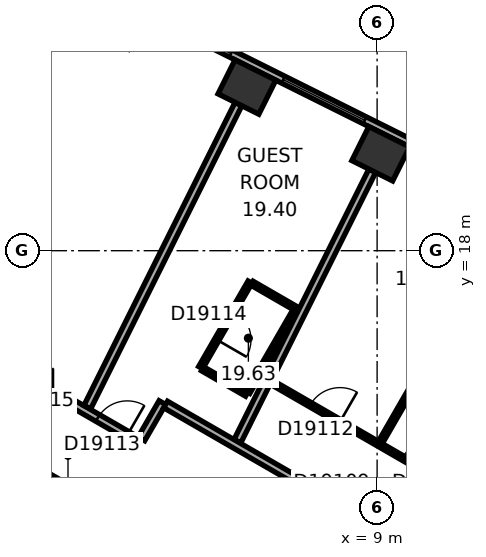
"""IFC4 building model, lengths in metres.
Left out: names, types, materials, properties, quantities, classifications, styles, units other than length and angle.
Written with IfcOpenShell. Run it as: python <this file> out.ifc"""

import sys

from ifc_helpers import new_model, si_unit, direction, frame, frame_2d, origin, origin_2d, place, context, subcontext, project, spatial, rectangle, extrude, element, fill, save


model = new_model("IFC4")
c1 = context("Model", 3, precision=1e-05, world=origin(), true_north=direction((0.0, 1.0)))
c2 = subcontext(c1, "Body", "Model", "MODEL_VIEW")
j1 = project(units=[si_unit("LENGTHUNIT", "METRE"), si_unit("PLANEANGLEUNIT", "RADIAN")], contexts=[c1])
p1 = place(None, origin())
s1 = spatial("IfcSite", under=j1, at=p1, CompositionType="ELEMENT")
p2 = place(p1, origin())
s2 = spatial("IfcBuilding", under=s1, at=p2, CompositionType="ELEMENT")
p3 = place(p2, frame((0.0, 0.0, 86.9)))
s3 = spatial("IfcBuildingStorey", under=s2, at=p3, CompositionType="ELEMENT", Elevation=86.9)
for number, where, z_axis, x_axis in (
    (1, (9.095, 20.551, 0.0), (0.0, 0.0, 1.0), (-0.895, 0.446, 0.0)),
    (2, (5.574, 22.306, 0.0), (0.0, 0.0, 1.0), (-0.895, 0.446, 0.0)),
):
    element("IfcColumn", number, at=place(p3, frame(where, z_axis=z_axis, x_axis=x_axis)), inside=s3, PredefinedType="COLUMN", context=c2, shape_type="SweptSolid", body=[
        extrude(rectangle(XDim=1.2, YDim=1.0, at=origin_2d()), origin(), (0.0, 0.0, 1.0), 3.3),
    ])
p4 = place(p3, frame((10.4, 5.658, 0.0), z_axis=(0.0, 0.0, 1.0), x_axis=(-0.866021384402, 0.500006961711, 0.0)))
e3 = element("IfcWall", 3, at=p4, inside=s3, PredefinedType="SHEAR", context=c2, shape_type="SweptSolid", body=[
    extrude(rectangle(XDim=12.355, YDim=1.2, at=frame_2d((6.178, 0.0))), origin(), (0.0, 0.0, 1.0), 3.3),
])
p5 = place(p4, frame((2.728, 0.0, 0.0)))
e4 = element("IfcOpeningElement", 4, at=p5, cuts=e3, PredefinedType="OPENING", context=c2, shape_type="SweptSolid", body=[
    extrude(rectangle(XDim=1.1, YDim=2.1, at=frame_2d((0.55, 1.05))), frame((0.0, 0.61, 0.0), z_axis=(0.0, -1.0, 0.0), x_axis=(1.0, 0.0, 0.0)), (0.0, 0.0, 1.0), 1.22),
])
p6 = place(p4, frame((5.328, 0.0, 0.0)))
e5 = element("IfcOpeningElement", 5, at=p6, cuts=e3, PredefinedType="OPENING", context=c2, shape_type="SweptSolid", body=[
    extrude(rectangle(XDim=1.1, YDim=2.1, at=frame_2d((0.55, 1.05))), frame((0.0, 0.61, 0.0), z_axis=(0.0, -1.0, 0.0), x_axis=(1.0, 0.0, 0.0)), (0.0, 0.0, 1.0), 1.22),
])
p7 = place(p4, frame((7.928, 0.0, 0.0)))
e6 = element("IfcOpeningElement", 6, at=p7, cuts=e3, PredefinedType="OPENING", context=c2, shape_type="SweptSolid", body=[
    extrude(rectangle(XDim=1.1, YDim=2.1, at=frame_2d((0.55, 1.05))), frame((0.0, 0.61, 0.0), z_axis=(0.0, -1.0, 0.0), x_axis=(1.0, 0.0, 0.0)), (0.0, 0.0, 1.0), 1.22),
])
p8 = place(p3, frame((0.3, 11.836, 0.0), z_axis=(0.0, 0.0, 1.0), x_axis=(-0.866021384402, -0.500006961711, 0.0)))
e7 = element("IfcWall", 7, at=p8, inside=s3, PredefinedType="SHEAR", context=c2, shape_type="SweptSolid", body=[
    extrude(rectangle(XDim=12.355, YDim=1.2, at=frame_2d((6.178, 0.0))), origin(), (0.0, 0.0, 1.0), 3.3),
])
p9 = place(p8, frame((6.378, 0.0, 0.0)))
e8 = element("IfcOpeningElement", 8, at=p9, cuts=e7, PredefinedType="OPENING", context=c2, shape_type="SweptSolid", body=[
    extrude(rectangle(XDim=1.5, YDim=2.1, at=frame_2d((0.75, 1.05))), frame((0.0, 0.61, 0.0), z_axis=(0.0, -1.0, 0.0), x_axis=(1.0, 0.0, 0.0)), (0.0, 0.0, 1.0), 1.22),
])
p10 = place(p8, frame((1.828, 0.0, 0.0)))
e9 = element("IfcOpeningElement", 9, at=p10, cuts=e7, PredefinedType="OPENING", context=c2, shape_type="SweptSolid", body=[
    extrude(rectangle(XDim=1.1, YDim=2.1, at=frame_2d((0.55, 1.05))), frame((0.0, 0.61, 0.0), z_axis=(0.0, -1.0, 0.0), x_axis=(1.0, 0.0, 0.0)), (0.0, 0.0, 1.0), 1.22),
])
p11 = place(p3, frame((20.63, 15.47, 0.0), z_axis=(0.0, 0.0, 1.0), x_axis=(-0.894934518609, 0.446197498203, 0.0)))
e10 = element("IfcWall", 10, at=p11, inside=s3, PredefinedType="STANDARD", context=c2, shape_type="SweptSolid", body=[
    extrude(rectangle(XDim=21.246, YDim=0.2, at=frame_2d((10.623, 0.0))), origin(), (0.0, 0.0, 1.0), 3.3),
])
p12 = place(p11, frame((1.553, 0.0, 0.8)))
e11 = element("IfcOpeningElement", 11, at=p12, cuts=e10, PredefinedType="OPENING", context=c2, shape_type="SweptSolid", body=[
    extrude(rectangle(XDim=2.4, YDim=1.7, at=frame_2d((1.2, 0.85))), frame((0.0, 0.11, 0.0), z_axis=(0.0, -1.0, 0.0), x_axis=(1.0, 0.0, 0.0)), (0.0, 0.0, 1.0), 0.22),
])
p13 = place(p11, frame((5.488, 0.0, 0.8)))
e12 = element("IfcOpeningElement", 12, at=p13, cuts=e10, PredefinedType="OPENING", context=c2, shape_type="SweptSolid", body=[
    extrude(rectangle(XDim=2.4, YDim=1.7, at=frame_2d((1.2, 0.85))), frame((0.0, 0.11, 0.0), z_axis=(0.0, -1.0, 0.0), x_axis=(1.0, 0.0, 0.0)), (0.0, 0.0, 1.0), 0.22),
])
p14 = place(p11, frame((9.422, 0.0, 0.8)))
e13 = element("IfcOpeningElement", 13, at=p14, cuts=e10, PredefinedType="OPENING", context=c2, shape_type="SweptSolid", body=[
    extrude(rectangle(XDim=2.4, YDim=1.7, at=frame_2d((1.2, 0.85))), frame((0.0, 0.11, 0.0), z_axis=(0.0, -1.0, 0.0), x_axis=(1.0, 0.0, 0.0)), (0.0, 0.0, 1.0), 0.22),
])
p15 = place(p11, frame((13.357, 0.0, 0.8)))
e14 = element("IfcOpeningElement", 14, at=p15, cuts=e10, PredefinedType="OPENING", context=c2, shape_type="SweptSolid", body=[
    extrude(rectangle(XDim=2.4, YDim=1.7, at=frame_2d((1.2, 0.85))), frame((0.0, 0.11, 0.0), z_axis=(0.0, -1.0, 0.0), x_axis=(1.0, 0.0, 0.0)), (0.0, 0.0, 1.0), 0.22),
])
p16 = place(p11, frame((17.292, 0.0, 0.8)))
e15 = element("IfcOpeningElement", 15, at=p16, cuts=e10, PredefinedType="OPENING", context=c2, shape_type="SweptSolid", body=[
    extrude(rectangle(XDim=2.4, YDim=1.7, at=frame_2d((1.2, 0.85))), frame((0.0, 0.11, 0.0), z_axis=(0.0, -1.0, 0.0), x_axis=(1.0, 0.0, 0.0)), (0.0, 0.0, 1.0), 0.22),
])
p17 = place(p3, frame((0.95, 14.001, 0.0), z_axis=(0.0, 0.0, 1.0), x_axis=(-1.0, 0.0, 0.0)))
e16 = element("IfcWall", 16, at=p17, inside=s3, PredefinedType="PARTITIONING", context=c2, shape_type="SweptSolid", body=[
    extrude(rectangle(XDim=1.86, YDim=0.2, at=frame_2d((0.93, 0.0))), origin(), (0.0, 0.0, 1.0), 3.05),
])
p18 = place(p17, frame((0.48, 0.0, 0.0)))
e17 = element("IfcOpeningElement", 17, at=p18, cuts=e16, PredefinedType="OPENING", context=c2, shape_type="SweptSolid", body=[
    extrude(rectangle(XDim=0.9, YDim=2.1, at=frame_2d((0.45, 1.05))), frame((0.0, 0.11, 0.0), z_axis=(0.0, -1.0, 0.0), x_axis=(1.0, 0.0, 0.0)), (0.0, 0.0, 1.0), 0.22),
])
p19 = place(p3, frame((2.748, 12.962, 0.0), z_axis=(0.0, 0.0, 1.0), x_axis=(-0.866013897511, 0.50001992892, 0.0)))
e18 = element("IfcWall", 18, at=p19, inside=s3, PredefinedType="PARTITIONING", context=c2, shape_type="SweptSolid", body=[
    extrude(rectangle(XDim=2.037, YDim=0.2, at=frame_2d((1.018, 0.0))), origin(), (0.0, 0.0, 1.0), 3.05),
])
p20 = place(p19, frame((0.372, 0.0, 0.0)))
e19 = element("IfcOpeningElement", 19, at=p20, cuts=e18, PredefinedType="OPENING", context=c2, shape_type="SweptSolid", body=[
    extrude(rectangle(XDim=0.9, YDim=2.1, at=frame_2d((0.45, 1.05))), frame((0.0, 0.11, 0.0), z_axis=(0.0, -1.0, 0.0), x_axis=(1.0, 0.0, 0.0)), (0.0, 0.0, 1.0), 0.22),
])
p21 = place(p3, frame((3.349, 14.002, 0.0), z_axis=(0.0, 0.0, 1.0), x_axis=(-0.500074377092, -0.865982457891, 0.0)))
e20 = element("IfcWall", 20, at=p21, inside=s3, PredefinedType="PARTITIONING", context=c2, shape_type="SweptSolid", body=[
    extrude(rectangle(XDim=1.101, YDim=0.2, at=frame_2d((0.55, 0.0))), origin(), (0.0, 0.0, 1.0), 3.05),
])
p22 = place(p3, frame((4.356, 14.922, 0.0), z_axis=(0.0, 0.0, 1.0), x_axis=(0.499936506574, 0.866062058628, 0.0)))
e21 = element("IfcWall", 21, at=p22, inside=s3, PredefinedType="PARTITIONING", context=c2, shape_type="SweptSolid", body=[
    extrude(rectangle(XDim=2.6, YDim=0.12, at=frame_2d((1.3, 0.0))), origin(), (0.0, 0.0, 1.0), 3.05),
])
p23 = place(p22, frame((0.85, 0.0, 0.0)))
e22 = element("IfcOpeningElement", 22, at=p23, cuts=e21, PredefinedType="OPENING", context=c2, shape_type="SweptSolid", body=[
    extrude(rectangle(XDim=0.9, YDim=2.1, at=frame_2d((0.45, 1.05))), frame((0.0, 0.07, 0.0), z_axis=(0.0, -1.0, 0.0), x_axis=(1.0, 0.0, 0.0)), (0.0, 0.0, 1.0), 0.14),
])
p24 = place(p3, frame((5.351, 21.859, 0.0), z_axis=(0.0, 0.0, 1.0), x_axis=(-0.446205309328, -0.894930624086, 0.0)))
e23 = element("IfcWall", 23, at=p24, inside=s3, PredefinedType="PARTITIONING", context=c2, shape_type="SweptSolid", body=[
    extrude(rectangle(XDim=8.913, YDim=0.2, at=frame_2d((4.457, 0.0))), origin(), (0.0, 0.0, 1.0), 2.6),
])
p25 = place(p3, frame((5.569, 14.222, 0.0), z_axis=(0.0, 0.0, 1.0), x_axis=(-0.866036909293, 0.499980071345, 0.0)))
e24 = element("IfcWall", 24, at=p25, inside=s3, PredefinedType="PARTITIONING", context=c2, shape_type="SweptSolid", body=[
    extrude(rectangle(XDim=1.34, YDim=0.12, at=frame_2d((0.67, 0.0))), origin(), (0.0, 0.0, 1.0), 3.05),
])
p26 = place(p3, frame((5.708, 17.144, 0.0), z_axis=(0.0, 0.0, 1.0), x_axis=(0.866082447003, -0.499901185229, 0.0)))
e25 = element("IfcWall", 25, at=p26, inside=s3, PredefinedType="PARTITIONING", context=c2, shape_type="SweptSolid", body=[
    extrude(rectangle(XDim=1.34, YDim=0.12, at=frame_2d((0.67, 0.0))), origin(), (0.0, 0.0, 1.0), 3.05),
])
p27 = place(p3, frame((6.839, 16.422, 0.0), z_axis=(0.0, 0.0, 1.0), x_axis=(-0.50000366821, -0.866023285932, 0.0)))
e26 = element("IfcWall", 26, at=p27, inside=s3, PredefinedType="PARTITIONING", context=c2, shape_type="SweptSolid", body=[
    extrude(rectangle(XDim=2.48, YDim=0.12, at=frame_2d((1.24, 0.0))), origin(), (0.0, 0.0, 1.0), 3.05),
])
p28 = place(p3, frame((8.872, 20.104, 0.0), z_axis=(0.0, 0.0, 1.0), x_axis=(-0.446218378653, -0.894924107706, 0.0)))
e27 = element("IfcWall", 27, at=p28, inside=s3, PredefinedType="PARTITIONING", context=c2, shape_type="SweptSolid", body=[
    extrude(rectangle(XDim=7.95, YDim=0.2, at=frame_2d((3.975, 0.0))), origin(), (0.0, 0.0, 1.0), 3.05),
])
p29 = place(p3, frame((10.885, 9.652, 0.0), z_axis=(0.0, 0.0, 1.0), x_axis=(-0.866033868542, 0.499985338323, 0.0)))
e28 = element("IfcWall", 28, at=p29, inside=s3, PredefinedType="PARTITIONING", context=c2, shape_type="SweptSolid", body=[
    extrude(rectangle(XDim=8.602, YDim=0.2, at=frame_2d((4.301, 0.0))), origin(), (0.0, 0.0, 1.0), 3.05),
])
p30 = place(p29, frame((2.739, 0.0, 0.0)))
e29 = element("IfcOpeningElement", 29, at=p30, cuts=e28, PredefinedType="OPENING", context=c2, shape_type="SweptSolid", body=[
    extrude(rectangle(XDim=1.0, YDim=2.1, at=frame_2d((0.5, 1.05))), frame((0.0, 0.11, 0.0), z_axis=(0.0, -1.0, 0.0), x_axis=(1.0, 0.0, 0.0)), (0.0, 0.0, 1.0), 0.22),
])
p31 = place(p3, frame((12.243, 18.423, 0.0), z_axis=(0.0, 0.0, 1.0), x_axis=(-0.499993523031, -0.866029143232, 0.0)))
e30 = element("IfcWall", 30, at=p31, inside=s3, PredefinedType="PARTITIONING", context=c2, shape_type="SweptSolid", body=[
    extrude(rectangle(XDim=6.315, YDim=0.12, at=frame_2d((3.157, 0.0))), origin(), (0.0, 0.0, 1.0), 2.6),
])
p32 = place(p3, frame((12.866, 10.702, 0.0), z_axis=(0.0, 0.0, 1.0), x_axis=(-0.866023151433, 0.500003901167, 0.0)))
e31 = element("IfcWall", 31, at=p32, inside=s3, PredefinedType="PARTITIONING", context=c2, shape_type="SweptSolid", body=[
    extrude(rectangle(XDim=7.684, YDim=0.12, at=frame_2d((3.842, 0.0))), origin(), (0.0, 0.0, 1.0), 3.05),
])
p33 = place(p32, frame((0.55, 0.0, 0.0)))
e32 = element("IfcOpeningElement", 32, at=p33, cuts=e31, PredefinedType="OPENING", context=c2, shape_type="SweptSolid", body=[
    extrude(rectangle(XDim=1.0, YDim=2.1, at=frame_2d((0.5, 1.05))), frame((0.0, 0.07, 0.0), z_axis=(0.0, -1.0, 0.0), x_axis=(1.0, 0.0, 0.0)), (0.0, 0.0, 1.0), 0.14),
])
p34 = place(p32, frame((2.8, 0.0, 0.0)))
e33 = element("IfcOpeningElement", 33, at=p34, cuts=e31, PredefinedType="OPENING", context=c2, shape_type="SweptSolid", body=[
    extrude(rectangle(XDim=0.9, YDim=2.1, at=frame_2d((0.45, 1.05))), frame((0.0, 0.07, 0.0), z_axis=(0.0, -1.0, 0.0), x_axis=(1.0, 0.0, 0.0)), (0.0, 0.0, 1.0), 0.14),
])
p35 = place(p32, frame((5.592, 0.0, 0.0)))
e34 = element("IfcOpeningElement", 34, at=p35, cuts=e31, PredefinedType="OPENING", context=c2, shape_type="SweptSolid", body=[
    extrude(rectangle(XDim=0.9, YDim=2.1, at=frame_2d((0.45, 1.05))), frame((0.0, 0.07, 0.0), z_axis=(0.0, -1.0, 0.0), x_axis=(1.0, 0.0, 0.0)), (0.0, 0.0, 1.0), 0.14),
])
p36 = place(p15, origin())
e35 = element("IfcWindow", 35, at=p36, inside=s3, PartitioningType="SINGLE_PANEL", PredefinedType="WINDOW", context=c2, shape_type="SweptSolid", body=[
    extrude(rectangle(XDim=2.4, YDim=1.7, at=frame_2d((1.2, 0.85))), frame((0.0, 0.03, 0.0), z_axis=(0.0, -1.0, 0.0), x_axis=(1.0, 0.0, 0.0)), (0.0, 0.0, 1.0), 0.06),
])
fill(e14, e35)
p37 = place(p16, origin())
e36 = element("IfcWindow", 36, at=p37, inside=s3, PartitioningType="SINGLE_PANEL", PredefinedType="WINDOW", context=c2, shape_type="SweptSolid", body=[
    extrude(rectangle(XDim=2.4, YDim=1.7, at=frame_2d((1.2, 0.85))), frame((0.0, 0.03, 0.0), z_axis=(0.0, -1.0, 0.0), x_axis=(1.0, 0.0, 0.0)), (0.0, 0.0, 1.0), 0.06),
])
fill(e15, e36)
p38 = place(p34, origin())
e37 = element("IfcDoor", 37, at=p38, inside=s3, OperationType="SINGLE_SWING_LEFT", PredefinedType="DOOR", context=c2, shape_type="SweptSolid", body=[
    extrude(rectangle(XDim=0.9, YDim=2.1, at=frame_2d((0.45, 1.05))), frame((0.0, 0.025, 0.0), z_axis=(0.0, -1.0, 0.0), x_axis=(1.0, 0.0, 0.0)), (0.0, 0.0, 1.0), 0.05),
])
fill(e33, e37)
p39 = place(p35, origin())
e38 = element("IfcDoor", 38, at=p39, inside=s3, OperationType="SINGLE_SWING_LEFT", PredefinedType="DOOR", context=c2, shape_type="SweptSolid", body=[
    extrude(rectangle(XDim=0.9, YDim=2.1, at=frame_2d((0.45, 1.05))), frame((0.0, 0.025, 0.0), z_axis=(0.0, -1.0, 0.0), x_axis=(1.0, 0.0, 0.0)), (0.0, 0.0, 1.0), 0.05),
])
fill(e34, e38)
p40 = place(p20, origin())
e39 = element("IfcDoor", 39, at=p40, inside=s3, OperationType="SINGLE_SWING_LEFT", PredefinedType="DOOR", context=c2, shape_type="SweptSolid", body=[
    extrude(rectangle(XDim=0.9, YDim=2.1, at=frame_2d((0.45, 1.05))), frame((0.0, 0.025, 0.0), z_axis=(0.0, -1.0, 0.0), x_axis=(1.0, 0.0, 0.0)), (0.0, 0.0, 1.0), 0.05),
])
fill(e19, e39)
p41 = place(p23, origin())
e40 = element("IfcDoor", 40, at=p41, inside=s3, OperationType="SINGLE_SWING_LEFT", PredefinedType="DOOR", context=c2, shape_type="SweptSolid", body=[
    extrude(rectangle(XDim=0.9, YDim=2.1, at=frame_2d((0.45, 1.05))), frame((0.0, 0.025, 0.0), z_axis=(0.0, -1.0, 0.0), x_axis=(1.0, 0.0, 0.0)), (0.0, 0.0, 1.0), 0.05),
])
fill(e22, e40)
p42 = place(p18, origin())
e41 = element("IfcDoor", 41, at=p42, inside=s3, OperationType="SINGLE_SWING_LEFT", PredefinedType="DOOR", context=c2, shape_type="SweptSolid", body=[
    extrude(rectangle(XDim=0.9, YDim=2.1, at=frame_2d((0.45, 1.05))), frame((0.0, 0.025, 0.0), z_axis=(0.0, -1.0, 0.0), x_axis=(1.0, 0.0, 0.0)), (0.0, 0.0, 1.0), 0.05),
])
fill(e17, e41)
save(model, sys.argv[1])
